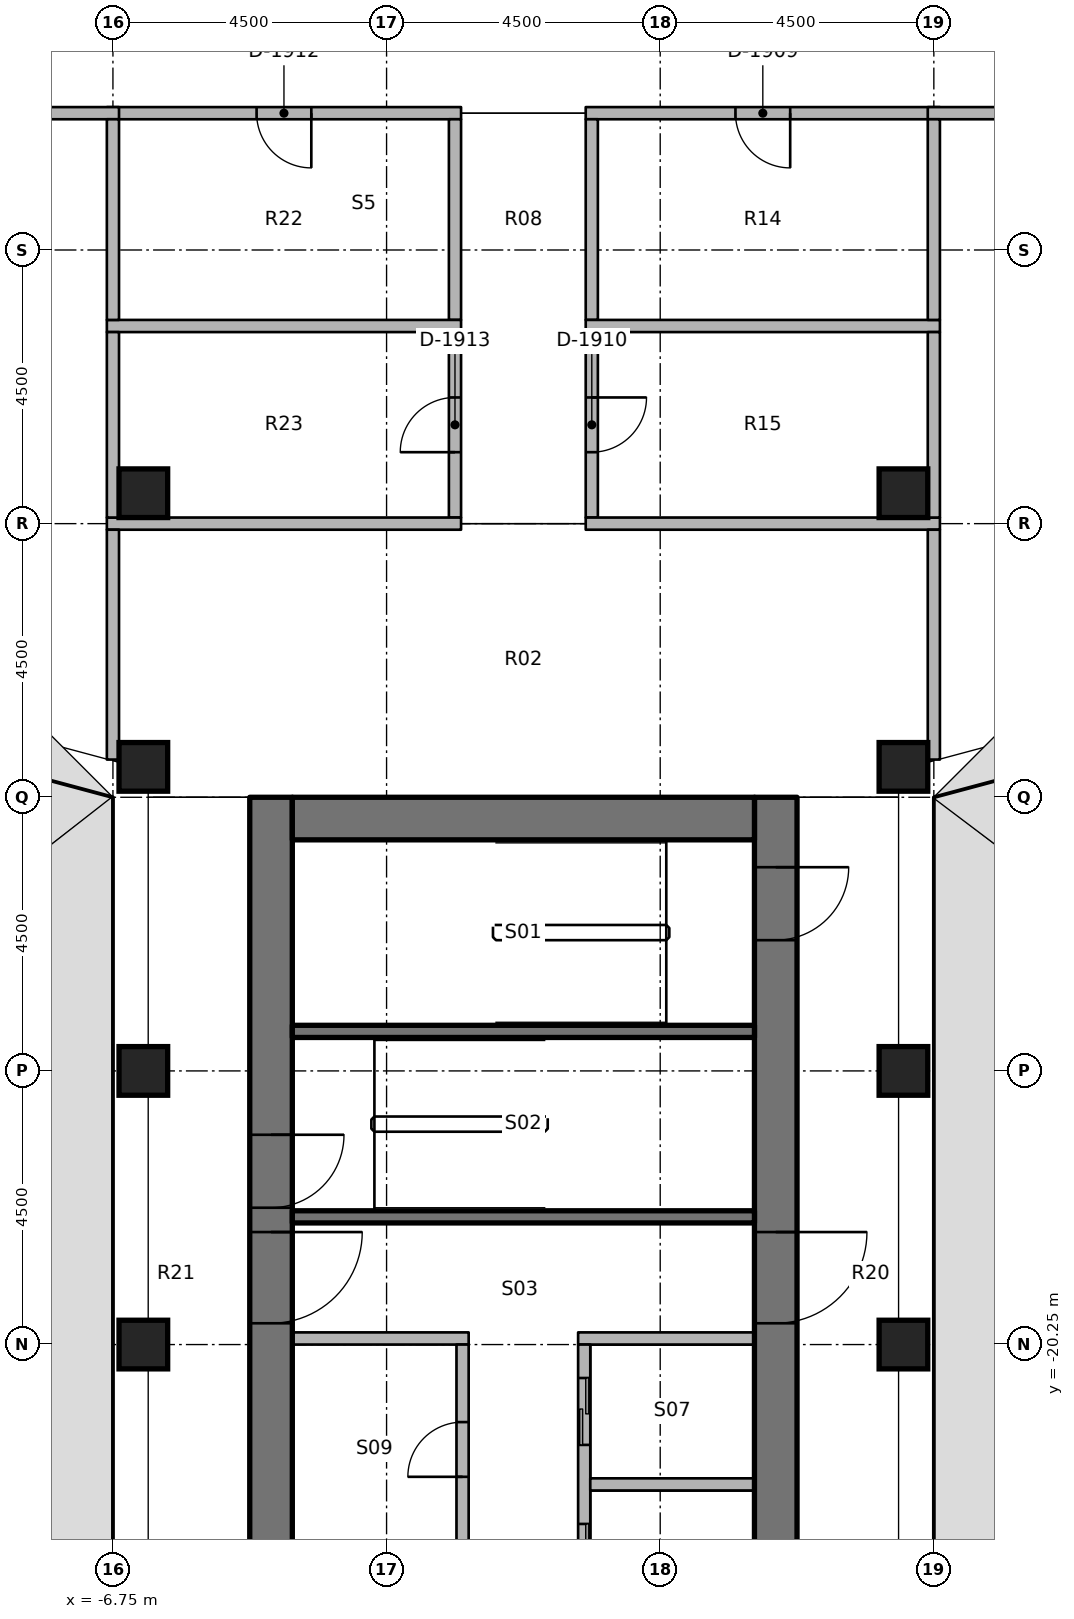
"""IFC4 building model, lengths in metres.
Left out: names, types, materials, properties, quantities, classifications, styles, units other than length and angle.
Written with IfcOpenShell. Run it as: python <this file> out.ifc"""

import sys

from ifc_helpers import new_model, si_unit, direction, frame, frame_2d, origin, origin_2d, place, context, subcontext, project, spatial, rectangle, extrude, element, fill, save


model = new_model("IFC4")
c1 = context("Model", 3, precision=1e-05, world=origin(), true_north=direction((0.0, 1.0)))
c2 = subcontext(c1, "Body", "Model", "MODEL_VIEW")
j1 = project(units=[si_unit("LENGTHUNIT", "METRE"), si_unit("PLANEANGLEUNIT", "RADIAN")], contexts=[c1])
p1 = place(None, origin())
s1 = spatial("IfcSite", under=j1, at=p1, CompositionType="ELEMENT")
p2 = place(p1, origin())
s2 = spatial("IfcBuilding", under=s1, at=p2, CompositionType="ELEMENT")
p3 = place(p2, frame((0.0, 0.0, 179.0)))
s3 = spatial("IfcBuildingStorey", under=s2, at=p3, CompositionType="ELEMENT", Elevation=179.0)
for number, where, z_axis, x_axis in (
    (1, (-6.25, -20.25, 0.0), (0.0, 0.0, 1.0), (1.0, 0.0, 0.0)),
    (2, (-6.25, -15.75, 0.0), (0.0, 0.0, 1.0), (1.0, 0.0, 0.0)),
    (3, (-6.25, -10.75, 0.0), (0.0, 0.0, 1.0), (1.0, 0.0, 0.0)),
    (4, (-6.25, -6.25, 0.0), (0.0, 0.0, 1.0), (1.0, 0.0, 0.0)),
    (5, (6.25, -20.25, 0.0), (0.0, 0.0, 1.0), (1.0, 0.0, 0.0)),
    (6, (6.25, -15.75, 0.0), (0.0, 0.0, 1.0), (1.0, 0.0, 0.0)),
    (7, (6.25, -10.75, 0.0), (0.0, 0.0, 1.0), (1.0, 0.0, 0.0)),
    (8, (6.25, -6.25, 0.0), (0.0, 0.0, 1.0), (1.0, 0.0, 0.0)),
):
    element("IfcColumn", number, at=place(p3, frame(where, z_axis=z_axis, x_axis=x_axis)), inside=s3, PredefinedType="COLUMN", context=c2, shape_type="SweptSolid", body=[
        extrude(rectangle(XDim=0.8, YDim=0.8, at=origin_2d()), origin(), (0.0, 0.0, 1.0), 3.65),
    ])
p4 = place(p3, frame((-4.15, -11.25, 0.0), z_axis=(0.0, 0.0, 1.0), x_axis=(0.0, -1.0, 0.0)))
e9 = element("IfcWall", 9, at=p4, inside=s3, PredefinedType="SHEAR", context=c2, shape_type="SweptSolid", body=[
    extrude(rectangle(XDim=15.0, YDim=0.7, at=frame_2d((7.5, 0.0))), origin(), (0.0, 0.0, 1.0), 3.8),
])
p5 = place(p4, frame((7.15, 0.0, 0.0)))
e10 = element("IfcOpeningElement", 10, at=p5, cuts=e9, PredefinedType="OPENING", context=c2, shape_type="SweptSolid", body=[
    extrude(rectangle(XDim=1.5, YDim=2.3, at=frame_2d((0.75, 1.15))), frame((0.0, 0.36, 0.0), z_axis=(0.0, -1.0, 0.0), x_axis=(1.0, 0.0, 0.0)), (0.0, 0.0, 1.0), 0.72),
])
p6 = place(p4, frame((5.55, 0.0, 0.0)))
e11 = element("IfcOpeningElement", 11, at=p6, cuts=e9, PredefinedType="OPENING", context=c2, shape_type="SweptSolid", body=[
    extrude(rectangle(XDim=1.2, YDim=2.1, at=frame_2d((0.6, 1.05))), frame((0.0, 0.36, 0.0), z_axis=(0.0, -1.0, 0.0), x_axis=(1.0, 0.0, 0.0)), (0.0, 0.0, 1.0), 0.72),
])
p7 = place(p3, frame((4.15, -11.25, 0.0), z_axis=(0.0, 0.0, 1.0), x_axis=(0.0, -1.0, 0.0)))
e12 = element("IfcWall", 12, at=p7, inside=s3, PredefinedType="SHEAR", context=c2, shape_type="SweptSolid", body=[
    extrude(rectangle(XDim=15.0, YDim=0.7, at=frame_2d((7.5, 0.0))), origin(), (0.0, 0.0, 1.0), 3.8),
])
p8 = place(p7, frame((7.15, 0.0, 0.0)))
e13 = element("IfcOpeningElement", 13, at=p8, cuts=e12, PredefinedType="OPENING", context=c2, shape_type="SweptSolid", body=[
    extrude(rectangle(XDim=1.5, YDim=2.3, at=frame_2d((0.75, 1.15))), frame((0.0, 0.36, 0.0), z_axis=(0.0, -1.0, 0.0), x_axis=(1.0, 0.0, 0.0)), (0.0, 0.0, 1.0), 0.72),
])
p9 = place(p7, frame((13.9, 0.0, 0.0)))
e14 = element("IfcOpeningElement", 14, at=p9, cuts=e12, PredefinedType="OPENING", context=c2, shape_type="SweptSolid", body=[
    extrude(rectangle(XDim=0.9, YDim=2.1, at=frame_2d((0.45, 1.05))), frame((0.0, 0.36, 0.0), z_axis=(0.0, -1.0, 0.0), x_axis=(1.0, 0.0, 0.0)), (0.0, 0.0, 1.0), 0.72),
])
p10 = place(p7, frame((1.15, 0.0, 0.0)))
e15 = element("IfcOpeningElement", 15, at=p10, cuts=e12, PredefinedType="OPENING", context=c2, shape_type="SweptSolid", body=[
    extrude(rectangle(XDim=1.2, YDim=2.1, at=frame_2d((0.6, 1.05))), frame((0.0, 0.36, 0.0), z_axis=(0.0, -1.0, 0.0), x_axis=(1.0, 0.0, 0.0)), (0.0, 0.0, 1.0), 0.72),
])
p11 = place(p3, frame((-3.8, -11.6, 0.0), z_axis=(0.0, 0.0, 1.0), x_axis=(1.0, 0.0, 0.0)))
e16 = element("IfcWall", 16, at=p11, inside=s3, PredefinedType="SHEAR", context=c2, shape_type="SweptSolid", body=[
    extrude(rectangle(XDim=7.6, YDim=0.7, at=frame_2d((3.8, 0.0))), origin(), (0.0, 0.0, 1.0), 3.8),
])
for number, where, z_axis, x_axis in (
    (17, (3.8, -18.15, 0.0), (0.0, 0.0, 1.0), (-1.0, 0.0, 0.0)),
    (18, (3.8, -15.1, 0.0), (0.0, 0.0, 1.0), (-1.0, 0.0, 0.0)),
):
    element("IfcWall", number, at=place(p3, frame(where, z_axis=z_axis, x_axis=x_axis)), inside=s3, PredefinedType="SHEAR", context=c2, shape_type="SweptSolid", body=[
        extrude(rectangle(XDim=7.6, YDim=0.2, at=frame_2d((3.8, 0.0))), origin(), (0.0, 0.0, 1.0), 3.65),
    ])
p12 = place(p3, frame((3.8, -20.15, 0.0), z_axis=(0.0, 0.0, 1.0), x_axis=(-1.0, 0.0, 0.0)))
e19 = element("IfcWall", 19, at=p12, inside=s3, PredefinedType="PARTITIONING", context=c2, shape_type="SweptSolid", body=[
    extrude(rectangle(XDim=2.9, YDim=0.2, at=frame_2d((1.45, 0.0))), origin(), (0.0, 0.0, 1.0), 3.65),
])
p13 = place(p3, frame((1.0, -24.85, 0.0), z_axis=(0.0, 0.0, 1.0), x_axis=(0.0, 1.0, 0.0)))
e20 = element("IfcWall", 20, at=p13, inside=s3, PredefinedType="PARTITIONING", context=c2, shape_type="SweptSolid", body=[
    extrude(rectangle(XDim=4.6, YDim=0.2, at=frame_2d((2.3, 0.0))), origin(), (0.0, 0.0, 1.0), 3.65),
])
p14 = place(p13, frame((0.55, 0.0, 0.0)))
e21 = element("IfcOpeningElement", 21, at=p14, cuts=e20, PredefinedType="OPENING", context=c2, shape_type="SweptSolid", body=[
    extrude(rectangle(XDim=1.1, YDim=2.3, at=frame_2d((0.55, 1.15))), frame((0.0, 0.11, 0.0), z_axis=(0.0, -1.0, 0.0), x_axis=(1.0, 0.0, 0.0)), (0.0, 0.0, 1.0), 0.22),
])
p15 = place(p13, frame((2.95, 0.0, 0.0)))
e22 = element("IfcOpeningElement", 22, at=p15, cuts=e20, PredefinedType="OPENING", context=c2, shape_type="SweptSolid", body=[
    extrude(rectangle(XDim=1.1, YDim=2.3, at=frame_2d((0.55, 1.15))), frame((0.0, 0.11, 0.0), z_axis=(0.0, -1.0, 0.0), x_axis=(1.0, 0.0, 0.0)), (0.0, 0.0, 1.0), 0.22),
])
p16 = place(p3, frame((-0.9, -20.15, 0.0), z_axis=(0.0, 0.0, 1.0), x_axis=(-1.0, 0.0, 0.0)))
e23 = element("IfcWall", 23, at=p16, inside=s3, PredefinedType="PARTITIONING", context=c2, shape_type="SweptSolid", body=[
    extrude(rectangle(XDim=2.9, YDim=0.2, at=frame_2d((1.45, 0.0))), origin(), (0.0, 0.0, 1.0), 3.65),
])
p17 = place(p3, frame((-1.0, -24.85, 0.0), z_axis=(0.0, 0.0, 1.0), x_axis=(0.0, 1.0, 0.0)))
e24 = element("IfcWall", 24, at=p17, inside=s3, PredefinedType="PARTITIONING", context=c2, shape_type="SweptSolid", body=[
    extrude(rectangle(XDim=4.6, YDim=0.2, at=frame_2d((2.3, 0.0))), origin(), (0.0, 0.0, 1.0), 3.65),
])
p18 = place(p17, frame((0.125, 0.0, 0.0)))
e25 = element("IfcOpeningElement", 25, at=p18, cuts=e24, PredefinedType="OPENING", context=c2, shape_type="SweptSolid", body=[
    extrude(rectangle(XDim=0.8, YDim=2.1, at=frame_2d((0.4, 1.05))), frame((0.0, 0.11, 0.0), z_axis=(0.0, -1.0, 0.0), x_axis=(1.0, 0.0, 0.0)), (0.0, 0.0, 1.0), 0.22),
])
p19 = place(p17, frame((2.425, 0.0, 0.0)))
e26 = element("IfcOpeningElement", 26, at=p19, cuts=e24, PredefinedType="OPENING", context=c2, shape_type="SweptSolid", body=[
    extrude(rectangle(XDim=0.9, YDim=2.1, at=frame_2d((0.45, 1.05))), frame((0.0, 0.11, 0.0), z_axis=(0.0, -1.0, 0.0), x_axis=(1.0, 0.0, 0.0)), (0.0, 0.0, 1.0), 0.22),
])
p20 = place(p3, frame((3.8, -22.55, 0.0), z_axis=(0.0, 0.0, 1.0), x_axis=(-1.0, 0.0, 0.0)))
e27 = element("IfcWall", 27, at=p20, inside=s3, PredefinedType="PARTITIONING", context=c2, shape_type="SweptSolid", body=[
    extrude(rectangle(XDim=2.7, YDim=0.2, at=frame_2d((1.35, 0.0))), origin(), (0.0, 0.0, 1.0), 3.65),
])
p21 = place(p3, frame((6.85, 0.0, 0.0), z_axis=(0.0, 0.0, 1.0), x_axis=(-1.0, 0.0, 0.0)))
e28 = element("IfcWall", 28, at=p21, inside=s3, PredefinedType="PARTITIONING", context=c2, shape_type="SweptSolid", body=[
    extrude(rectangle(XDim=5.825, YDim=0.2, at=frame_2d((2.913, 0.0))), origin(), (0.0, 0.0, 1.0), 2.75),
])
p22 = place(p21, frame((2.462, 0.0, 0.0)))
e29 = element("IfcOpeningElement", 29, at=p22, cuts=e28, PredefinedType="OPENING", context=c2, shape_type="SweptSolid", body=[
    extrude(rectangle(XDim=0.9, YDim=2.1, at=frame_2d((0.45, 1.05))), frame((0.0, 0.11, 0.0), z_axis=(0.0, -1.0, 0.0), x_axis=(1.0, 0.0, 0.0)), (0.0, 0.0, 1.0), 0.22),
])
p23 = place(p3, frame((11.35, 0.0, 0.0), z_axis=(0.0, 0.0, 1.0), x_axis=(-1.0, 0.0, 0.0)))
e30 = element("IfcWall", 30, at=p23, inside=s3, PredefinedType="PARTITIONING", context=c2, shape_type="SweptSolid", body=[
    extrude(rectangle(XDim=4.7, YDim=0.2, at=frame_2d((2.35, 0.0))), origin(), (0.0, 0.0, 1.0), 2.75),
])
p24 = place(p23, frame((1.85, 0.0, 0.0)))
e31 = element("IfcOpeningElement", 31, at=p24, cuts=e30, PredefinedType="OPENING", context=c2, shape_type="SweptSolid", body=[
    extrude(rectangle(XDim=1.0, YDim=2.1, at=frame_2d((0.5, 1.05))), frame((0.0, 0.11, 0.0), z_axis=(0.0, -1.0, 0.0), x_axis=(1.0, 0.0, 0.0)), (0.0, 0.0, 1.0), 0.22),
])
p25 = place(p3, frame((-1.025, 0.0, 0.0), z_axis=(0.0, 0.0, 1.0), x_axis=(-1.0, 0.0, 0.0)))
e32 = element("IfcWall", 32, at=p25, inside=s3, PredefinedType="PARTITIONING", context=c2, shape_type="SweptSolid", body=[
    extrude(rectangle(XDim=5.825, YDim=0.2, at=frame_2d((2.913, 0.0))), origin(), (0.0, 0.0, 1.0), 2.75),
])
p26 = place(p25, frame((2.462, 0.0, 0.0)))
e33 = element("IfcOpeningElement", 33, at=p26, cuts=e32, PredefinedType="OPENING", context=c2, shape_type="SweptSolid", body=[
    extrude(rectangle(XDim=0.9, YDim=2.1, at=frame_2d((0.45, 1.05))), frame((0.0, 0.11, 0.0), z_axis=(0.0, -1.0, 0.0), x_axis=(1.0, 0.0, 0.0)), (0.0, 0.0, 1.0), 0.22),
])
p27 = place(p3, frame((-6.65, 0.0, 0.0), z_axis=(0.0, 0.0, 1.0), x_axis=(-1.0, 0.0, 0.0)))
e34 = element("IfcWall", 34, at=p27, inside=s3, PredefinedType="PARTITIONING", context=c2, shape_type="SweptSolid", body=[
    extrude(rectangle(XDim=4.7, YDim=0.2, at=frame_2d((2.35, 0.0))), origin(), (0.0, 0.0, 1.0), 2.75),
])
p28 = place(p27, frame((1.85, 0.0, 0.0)))
e35 = element("IfcOpeningElement", 35, at=p28, cuts=e34, PredefinedType="OPENING", context=c2, shape_type="SweptSolid", body=[
    extrude(rectangle(XDim=1.0, YDim=2.1, at=frame_2d((0.5, 1.05))), frame((0.0, 0.11, 0.0), z_axis=(0.0, -1.0, 0.0), x_axis=(1.0, 0.0, 0.0)), (0.0, 0.0, 1.0), 0.22),
])
p29 = place(p3, frame((1.125, -3.4, 0.0), z_axis=(0.0, 0.0, 1.0), x_axis=(0.0, 1.0, 0.0)))
e36 = element("IfcWall", 36, at=p29, inside=s3, PredefinedType="PARTITIONING", context=c2, shape_type="SweptSolid", body=[
    extrude(rectangle(XDim=3.3, YDim=0.2, at=frame_2d((1.65, 0.0))), origin(), (0.0, 0.0, 1.0), 2.75),
])
p30 = place(p3, frame((1.125, -3.6, 0.0), z_axis=(0.0, 0.0, 1.0), x_axis=(0.0, -1.0, 0.0)))
e37 = element("IfcWall", 37, at=p30, inside=s3, PredefinedType="PARTITIONING", context=c2, shape_type="SweptSolid", body=[
    extrude(rectangle(XDim=3.05, YDim=0.2, at=frame_2d((1.525, 0.0))), origin(), (0.0, 0.0, 1.0), 2.75),
])
p31 = place(p30, frame((1.075, 0.0, 0.0)))
e38 = element("IfcOpeningElement", 38, at=p31, cuts=e37, PredefinedType="OPENING", context=c2, shape_type="SweptSolid", body=[
    extrude(rectangle(XDim=0.9, YDim=2.1, at=frame_2d((0.45, 1.05))), frame((0.0, 0.11, 0.0), z_axis=(0.0, -1.0, 0.0), x_axis=(1.0, 0.0, 0.0)), (0.0, 0.0, 1.0), 0.22),
])
p32 = place(p3, frame((-1.125, -3.4, 0.0), z_axis=(0.0, 0.0, 1.0), x_axis=(0.0, 1.0, 0.0)))
e39 = element("IfcWall", 39, at=p32, inside=s3, PredefinedType="PARTITIONING", context=c2, shape_type="SweptSolid", body=[
    extrude(rectangle(XDim=3.3, YDim=0.2, at=frame_2d((1.65, 0.0))), origin(), (0.0, 0.0, 1.0), 2.75),
])
p33 = place(p3, frame((-1.125, -6.65, 0.0), z_axis=(0.0, 0.0, 1.0), x_axis=(0.0, 1.0, 0.0)))
e40 = element("IfcWall", 40, at=p33, inside=s3, PredefinedType="PARTITIONING", context=c2, shape_type="SweptSolid", body=[
    extrude(rectangle(XDim=3.05, YDim=0.2, at=frame_2d((1.525, 0.0))), origin(), (0.0, 0.0, 1.0), 2.75),
])
p34 = place(p33, frame((1.075, 0.0, 0.0)))
e41 = element("IfcOpeningElement", 41, at=p34, cuts=e40, PredefinedType="OPENING", context=c2, shape_type="SweptSolid", body=[
    extrude(rectangle(XDim=0.9, YDim=2.1, at=frame_2d((0.45, 1.05))), frame((0.0, 0.11, 0.0), z_axis=(0.0, -1.0, 0.0), x_axis=(1.0, 0.0, 0.0)), (0.0, 0.0, 1.0), 0.22),
])
p35 = place(p3, frame((1.025, -6.75, 0.0), z_axis=(0.0, 0.0, 1.0), x_axis=(1.0, 0.0, 0.0)))
e42 = element("IfcWall", 42, at=p35, inside=s3, PredefinedType="PARTITIONING", context=c2, shape_type="SweptSolid", body=[
    extrude(rectangle(XDim=5.825, YDim=0.2, at=frame_2d((2.913, 0.0))), origin(), (0.0, 0.0, 1.0), 2.75),
])
p36 = place(p3, frame((6.75, -10.63, 0.0), z_axis=(0.0, 0.0, 1.0), x_axis=(0.0, 1.0, 0.0)))
e43 = element("IfcWall", 43, at=p36, inside=s3, PredefinedType="PARTITIONING", context=c2, shape_type="SweptSolid", body=[
    extrude(rectangle(XDim=3.78, YDim=0.2, at=frame_2d((1.89, 0.0))), origin(), (0.0, 0.0, 1.0), 2.75),
])
p37 = place(p3, frame((-6.85, -6.75, 0.0), z_axis=(0.0, 0.0, 1.0), x_axis=(1.0, 0.0, 0.0)))
e44 = element("IfcWall", 44, at=p37, inside=s3, PredefinedType="PARTITIONING", context=c2, shape_type="SweptSolid", body=[
    extrude(rectangle(XDim=5.825, YDim=0.2, at=frame_2d((2.913, 0.0))), origin(), (0.0, 0.0, 1.0), 2.75),
])
p38 = place(p3, frame((-6.75, -10.63, 0.0), z_axis=(0.0, 0.0, 1.0), x_axis=(0.0, 1.0, 0.0)))
e45 = element("IfcWall", 45, at=p38, inside=s3, PredefinedType="PARTITIONING", context=c2, shape_type="SweptSolid", body=[
    extrude(rectangle(XDim=3.78, YDim=0.2, at=frame_2d((1.89, 0.0))), origin(), (0.0, 0.0, 1.0), 2.75),
])
p39 = place(p3, frame((1.025, -3.5, 0.0), z_axis=(0.0, 0.0, 1.0), x_axis=(1.0, 0.0, 0.0)))
e46 = element("IfcWall", 46, at=p39, inside=s3, PredefinedType="PARTITIONING", context=c2, shape_type="SweptSolid", body=[
    extrude(rectangle(XDim=5.825, YDim=0.2, at=frame_2d((2.913, 0.0))), origin(), (0.0, 0.0, 1.0), 2.75),
])
p40 = place(p3, frame((6.75, -3.4, 0.0), z_axis=(0.0, 0.0, 1.0), x_axis=(0.0, 1.0, 0.0)))
e47 = element("IfcWall", 47, at=p40, inside=s3, PredefinedType="PARTITIONING", context=c2, shape_type="SweptSolid", body=[
    extrude(rectangle(XDim=3.3, YDim=0.2, at=frame_2d((1.65, 0.0))), origin(), (0.0, 0.0, 1.0), 2.75),
])
p41 = place(p3, frame((6.75, -6.65, 0.0), z_axis=(0.0, 0.0, 1.0), x_axis=(0.0, 1.0, 0.0)))
e48 = element("IfcWall", 48, at=p41, inside=s3, PredefinedType="PARTITIONING", context=c2, shape_type="SweptSolid", body=[
    extrude(rectangle(XDim=3.05, YDim=0.2, at=frame_2d((1.525, 0.0))), origin(), (0.0, 0.0, 1.0), 2.75),
])
p42 = place(p3, frame((-6.85, -3.5, 0.0), z_axis=(0.0, 0.0, 1.0), x_axis=(1.0, 0.0, 0.0)))
e49 = element("IfcWall", 49, at=p42, inside=s3, PredefinedType="PARTITIONING", context=c2, shape_type="SweptSolid", body=[
    extrude(rectangle(XDim=5.825, YDim=0.2, at=frame_2d((2.913, 0.0))), origin(), (0.0, 0.0, 1.0), 2.75),
])
p43 = place(p3, frame((-6.75, -3.4, 0.0), z_axis=(0.0, 0.0, 1.0), x_axis=(0.0, 1.0, 0.0)))
e50 = element("IfcWall", 50, at=p43, inside=s3, PredefinedType="PARTITIONING", context=c2, shape_type="SweptSolid", body=[
    extrude(rectangle(XDim=3.3, YDim=0.2, at=frame_2d((1.65, 0.0))), origin(), (0.0, 0.0, 1.0), 2.75),
])
p44 = place(p3, frame((-6.75, -6.65, 0.0), z_axis=(0.0, 0.0, 1.0), x_axis=(0.0, 1.0, 0.0)))
e51 = element("IfcWall", 51, at=p44, inside=s3, PredefinedType="PARTITIONING", context=c2, shape_type="SweptSolid", body=[
    extrude(rectangle(XDim=3.05, YDim=0.2, at=frame_2d((1.525, 0.0))), origin(), (0.0, 0.0, 1.0), 2.75),
])
p45 = place(p8, origin())
e52 = element("IfcDoor", 52, at=p45, inside=s3, OperationType="DOUBLE_DOOR_SINGLE_SWING", PredefinedType="DOOR", context=c2, shape_type="SweptSolid", body=[
    extrude(rectangle(XDim=1.5, YDim=2.3, at=frame_2d((0.75, 1.15))), frame((0.0, 0.025, 0.0), z_axis=(0.0, -1.0, 0.0), x_axis=(1.0, 0.0, 0.0)), (0.0, 0.0, 1.0), 0.05),
])
fill(e13, e52)
p46 = place(p5, origin())
e53 = element("IfcDoor", 53, at=p46, inside=s3, OperationType="DOUBLE_DOOR_SINGLE_SWING", PredefinedType="DOOR", context=c2, shape_type="SweptSolid", body=[
    extrude(rectangle(XDim=1.5, YDim=2.3, at=frame_2d((0.75, 1.15))), frame((0.0, 0.025, 0.0), z_axis=(0.0, -1.0, 0.0), x_axis=(1.0, 0.0, 0.0)), (0.0, 0.0, 1.0), 0.05),
])
fill(e10, e53)
p47 = place(p6, origin())
e54 = element("IfcDoor", 54, at=p47, inside=s3, OperationType="SINGLE_SWING_RIGHT", PredefinedType="DOOR", context=c2, shape_type="SweptSolid", body=[
    extrude(rectangle(XDim=1.2, YDim=2.1, at=frame_2d((0.6, 1.05))), frame((0.0, 0.025, 0.0), z_axis=(0.0, -1.0, 0.0), x_axis=(1.0, 0.0, 0.0)), (0.0, 0.0, 1.0), 0.05),
])
fill(e11, e54)
p48 = place(p10, origin())
e55 = element("IfcDoor", 55, at=p48, inside=s3, OperationType="SINGLE_SWING_LEFT", PredefinedType="DOOR", context=c2, shape_type="SweptSolid", body=[
    extrude(rectangle(XDim=1.2, YDim=2.1, at=frame_2d((0.6, 1.05))), frame((0.0, 0.025, 0.0), z_axis=(0.0, -1.0, 0.0), x_axis=(1.0, 0.0, 0.0)), (0.0, 0.0, 1.0), 0.05),
])
fill(e15, e55)
p49 = place(p14, origin())
e56 = element("IfcDoor", 56, at=p49, inside=s3, OperationType="DOUBLE_DOOR_SLIDING", PredefinedType="DOOR", context=c2, shape_type="SweptSolid", body=[
    extrude(rectangle(XDim=1.1, YDim=2.3, at=frame_2d((0.55, 1.15))), frame((0.0, 0.025, 0.0), z_axis=(0.0, -1.0, 0.0), x_axis=(1.0, 0.0, 0.0)), (0.0, 0.0, 1.0), 0.05),
])
fill(e21, e56)
p50 = place(p15, origin())
e57 = element("IfcDoor", 57, at=p50, inside=s3, OperationType="DOUBLE_DOOR_SLIDING", PredefinedType="DOOR", context=c2, shape_type="SweptSolid", body=[
    extrude(rectangle(XDim=1.1, YDim=2.3, at=frame_2d((0.55, 1.15))), frame((0.0, 0.025, 0.0), z_axis=(0.0, -1.0, 0.0), x_axis=(1.0, 0.0, 0.0)), (0.0, 0.0, 1.0), 0.05),
])
fill(e22, e57)
p51 = place(p19, origin())
e58 = element("IfcDoor", 58, at=p51, inside=s3, OperationType="SINGLE_SWING_RIGHT", PredefinedType="DOOR", context=c2, shape_type="SweptSolid", body=[
    extrude(rectangle(XDim=0.9, YDim=2.1, at=frame_2d((0.45, 1.05))), frame((0.0, 0.025, 0.0), z_axis=(0.0, -1.0, 0.0), x_axis=(1.0, 0.0, 0.0)), (0.0, 0.0, 1.0), 0.05),
])
fill(e26, e58)
p52 = place(p22, origin())
e59 = element("IfcDoor", 59, at=p52, inside=s3, OperationType="SINGLE_SWING_RIGHT", PredefinedType="DOOR", context=c2, shape_type="SweptSolid", body=[
    extrude(rectangle(XDim=0.9, YDim=2.1, at=frame_2d((0.45, 1.05))), frame((0.0, 0.025, 0.0), z_axis=(0.0, -1.0, 0.0), x_axis=(1.0, 0.0, 0.0)), (0.0, 0.0, 1.0), 0.05),
])
fill(e29, e59)
p53 = place(p31, origin())
e60 = element("IfcDoor", 60, at=p53, inside=s3, OperationType="SINGLE_SWING_LEFT", PredefinedType="DOOR", context=c2, shape_type="SweptSolid", body=[
    extrude(rectangle(XDim=0.9, YDim=2.1, at=frame_2d((0.45, 1.05))), frame((0.0, 0.025, 0.0), z_axis=(0.0, -1.0, 0.0), x_axis=(1.0, 0.0, 0.0)), (0.0, 0.0, 1.0), 0.05),
])
fill(e38, e60)
p54 = place(p26, origin())
e61 = element("IfcDoor", 61, at=p54, inside=s3, OperationType="SINGLE_SWING_RIGHT", PredefinedType="DOOR", context=c2, shape_type="SweptSolid", body=[
    extrude(rectangle(XDim=0.9, YDim=2.1, at=frame_2d((0.45, 1.05))), frame((0.0, 0.025, 0.0), z_axis=(0.0, -1.0, 0.0), x_axis=(1.0, 0.0, 0.0)), (0.0, 0.0, 1.0), 0.05),
])
fill(e33, e61)
p55 = place(p34, origin())
e62 = element("IfcDoor", 62, at=p55, inside=s3, OperationType="SINGLE_SWING_RIGHT", PredefinedType="DOOR", context=c2, shape_type="SweptSolid", body=[
    extrude(rectangle(XDim=0.9, YDim=2.1, at=frame_2d((0.45, 1.05))), frame((0.0, 0.025, 0.0), z_axis=(0.0, -1.0, 0.0), x_axis=(1.0, 0.0, 0.0)), (0.0, 0.0, 1.0), 0.05),
])
fill(e41, e62)
save(model, sys.argv[1])
